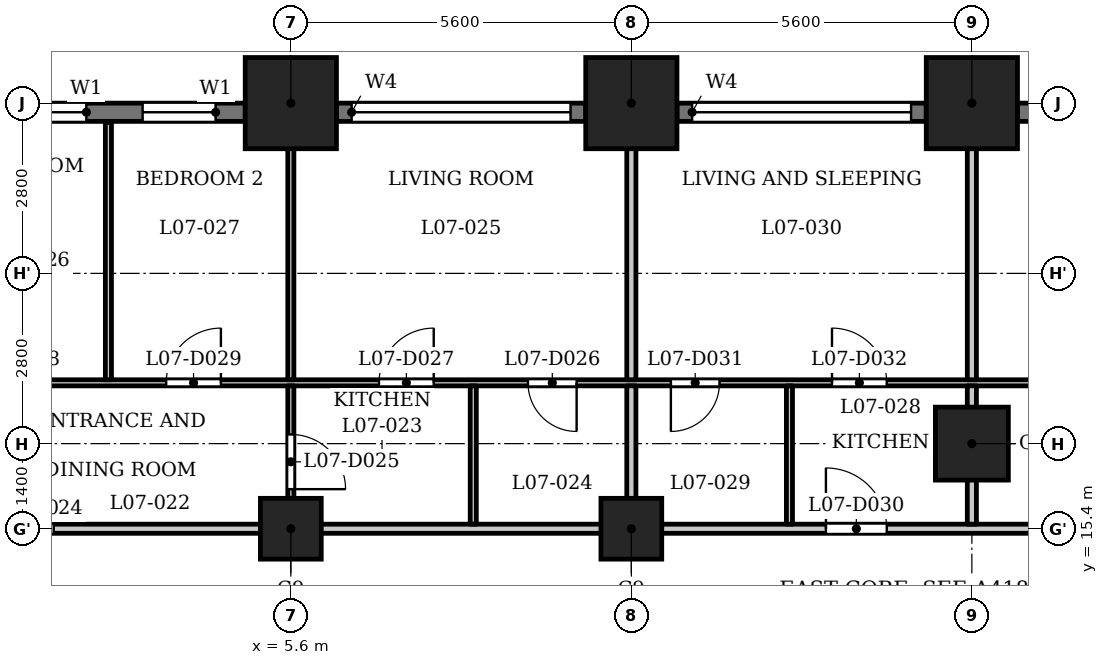
"""IFC4 building model, lengths in metres.
Left out: names, types, materials, properties, quantities, classifications, styles, units other than length and angle.
Written with IfcOpenShell. Run it as: python <this file> out.ifc"""

import sys

from ifc_helpers import new_model, si_unit, direction, frame, frame_2d, origin, origin_2d, place, context, subcontext, project, spatial, rectangle, extrude, element, fill, save


model = new_model("IFC4")
c1 = context("Model", 3, precision=1e-05, world=origin(), true_north=direction((0.0, 1.0)))
c2 = subcontext(c1, "Body", "Model", "MODEL_VIEW")
j1 = project(units=[si_unit("LENGTHUNIT", "METRE"), si_unit("PLANEANGLEUNIT", "RADIAN")], contexts=[c1])
p1 = place(None, origin())
s1 = spatial("IfcSite", under=j1, at=p1, CompositionType="ELEMENT")
p2 = place(p1, origin())
s2 = spatial("IfcBuilding", under=s1, at=p2, CompositionType="ELEMENT")
p3 = place(p2, frame((0.0, 0.0, 34.0)))
s3 = spatial("IfcBuildingStorey", under=s2, at=p3, CompositionType="ELEMENT", Elevation=34.0)
for number, where, z_axis, x_axis in (
    (1, (16.8, 22.4, 0.0), (0.0, 0.0, 1.0), (1.0, 0.0, 0.0)),
    (2, (11.2, 22.4, 0.0), (0.0, 0.0, 1.0), (1.0, 0.0, 0.0)),
    (3, (5.6, 22.4, 0.0), (0.0, 0.0, 1.0), (1.0, 0.0, 0.0)),
):
    element("IfcColumn", number, at=place(p3, frame(where, z_axis=z_axis, x_axis=x_axis)), inside=s3, PredefinedType="COLUMN", context=c2, shape_type="SweptSolid", body=[
        extrude(rectangle(XDim=1.5, YDim=1.5, at=origin_2d()), origin(), (0.0, 0.0, 1.0), 3.5),
    ])
p4 = place(p3, frame((16.8, 16.8, 0.0), z_axis=(0.0, 0.0, 1.0), x_axis=(1.0, 0.0, 0.0)))
e4 = element("IfcColumn", 4, at=p4, inside=s3, PredefinedType="COLUMN", context=c2, shape_type="SweptSolid", body=[
    extrude(rectangle(XDim=1.2, YDim=1.2, at=origin_2d()), origin(), (0.0, 0.0, 1.0), 3.5),
])
for number, where, z_axis, x_axis in (
    (5, (5.6, 15.4, 0.0), (0.0, 0.0, 1.0), (1.0, 0.0, 0.0)),
    (6, (11.2, 15.4, 0.0), (0.0, 0.0, 1.0), (1.0, 0.0, 0.0)),
):
    element("IfcColumn", number, at=place(p3, frame(where, z_axis=z_axis, x_axis=x_axis)), inside=s3, PredefinedType="COLUMN", context=c2, shape_type="SweptSolid", body=[
        extrude(rectangle(XDim=1.0, YDim=1.0, at=origin_2d()), origin(), (0.0, 0.0, 1.0), 3.5),
    ])
p5 = place(p3, frame((20.0, 22.25, 0.0), z_axis=(0.0, 0.0, 1.0), x_axis=(-1.0, 0.0, 0.0)))
e7 = element("IfcWall", 7, at=p5, inside=s3, PredefinedType="SOLIDWALL", context=c2, shape_type="SweptSolid", body=[
    extrude(rectangle(XDim=2.45, YDim=0.3, at=frame_2d((1.225, 0.0))), origin(), (0.0, 0.0, 1.0), 2.35),
])
p6 = place(p5, frame((0.625, 0.0, 0.6)))
e8 = element("IfcOpeningElement", 8, at=p6, cuts=e7, PredefinedType="OPENING", context=c2, shape_type="SweptSolid", body=[
    extrude(rectangle(XDim=1.2, YDim=1.55, at=frame_2d((0.6, 0.775))), frame((0.0, 0.16, 0.0), z_axis=(0.0, -1.0, 0.0), x_axis=(1.0, 0.0, 0.0)), (0.0, 0.0, 1.0), 0.32),
])
p7 = place(p3, frame((16.05, 22.25, 0.0), z_axis=(0.0, 0.0, 1.0), x_axis=(-1.0, 0.0, 0.0)))
e9 = element("IfcWall", 9, at=p7, inside=s3, PredefinedType="SOLIDWALL", context=c2, shape_type="SweptSolid", body=[
    extrude(rectangle(XDim=4.1, YDim=0.3, at=frame_2d((2.05, 0.0))), origin(), (0.0, 0.0, 1.0), 2.35),
])
p8 = place(p7, frame((0.25, 0.0, 1.2)))
e10 = element("IfcOpeningElement", 10, at=p8, cuts=e9, PredefinedType="OPENING", context=c2, shape_type="SweptSolid", body=[
    extrude(rectangle(XDim=3.6, YDim=0.95, at=frame_2d((1.8, 0.475))), frame((0.0, 0.16, 0.0), z_axis=(0.0, -1.0, 0.0), x_axis=(1.0, 0.0, 0.0)), (0.0, 0.0, 1.0), 0.32),
])
p9 = place(p3, frame((10.45, 22.25, 0.0), z_axis=(0.0, 0.0, 1.0), x_axis=(-1.0, 0.0, 0.0)))
e11 = element("IfcWall", 11, at=p9, inside=s3, PredefinedType="SOLIDWALL", context=c2, shape_type="SweptSolid", body=[
    extrude(rectangle(XDim=4.1, YDim=0.3, at=frame_2d((2.05, 0.0))), origin(), (0.0, 0.0, 1.0), 2.35),
])
p10 = place(p9, frame((0.25, 0.0, 1.2)))
e12 = element("IfcOpeningElement", 12, at=p10, cuts=e11, PredefinedType="OPENING", context=c2, shape_type="SweptSolid", body=[
    extrude(rectangle(XDim=3.6, YDim=0.95, at=frame_2d((1.8, 0.475))), frame((0.0, 0.16, 0.0), z_axis=(0.0, -1.0, 0.0), x_axis=(1.0, 0.0, 0.0)), (0.0, 0.0, 1.0), 0.32),
])
p11 = place(p3, frame((4.85, 22.25, 0.0), z_axis=(0.0, 0.0, 1.0), x_axis=(-1.0, 0.0, 0.0)))
e13 = element("IfcWall", 13, at=p11, inside=s3, PredefinedType="SOLIDWALL", context=c2, shape_type="SweptSolid", body=[
    extrude(rectangle(XDim=4.1, YDim=0.3, at=frame_2d((2.05, 0.0))), origin(), (0.0, 0.0, 1.0), 2.35),
])
p12 = place(p11, frame((0.488, 0.0, 0.6)))
e14 = element("IfcOpeningElement", 14, at=p12, cuts=e13, PredefinedType="OPENING", context=c2, shape_type="SweptSolid", body=[
    extrude(rectangle(XDim=1.2, YDim=1.55, at=frame_2d((0.6, 0.775))), frame((0.0, 0.16, 0.0), z_axis=(0.0, -1.0, 0.0), x_axis=(1.0, 0.0, 0.0)), (0.0, 0.0, 1.0), 0.32),
])
p13 = place(p11, frame((2.613, 0.0, 0.6)))
e15 = element("IfcOpeningElement", 15, at=p13, cuts=e13, PredefinedType="OPENING", context=c2, shape_type="SweptSolid", body=[
    extrude(rectangle(XDim=1.2, YDim=1.55, at=frame_2d((0.6, 0.775))), frame((0.0, 0.16, 0.0), z_axis=(0.0, -1.0, 0.0), x_axis=(1.0, 0.0, 0.0)), (0.0, 0.0, 1.0), 0.32),
])
p14 = place(p3, frame((-27.484, 15.4, 0.0), z_axis=(0.0, 0.0, 1.0), x_axis=(1.0, 0.0, 0.0)))
e16 = element("IfcWall", 16, at=p14, inside=s3, PredefinedType="PARTITIONING", context=c2, shape_type="SweptSolid", body=[
    extrude(rectangle(XDim=54.968, YDim=0.15, at=frame_2d((27.484, 0.0))), origin(), (0.0, 0.0, 1.0), 3.2),
])
p15 = place(p14, frame((8.784, 0.0, 0.0)))
e17 = element("IfcOpeningElement", 17, at=p15, cuts=e16, PredefinedType="OPENING", context=c2, shape_type="SweptSolid", body=[
    extrude(rectangle(XDim=1.0, YDim=2.1, at=frame_2d((0.5, 1.05))), frame((0.0, 0.085, 0.0), z_axis=(0.0, -1.0, 0.0), x_axis=(1.0, 0.0, 0.0)), (0.0, 0.0, 1.0), 0.17),
])
p16 = place(p14, frame((14.634, 0.0, 0.0)))
e18 = element("IfcOpeningElement", 18, at=p16, cuts=e16, PredefinedType="OPENING", context=c2, shape_type="SweptSolid", body=[
    extrude(rectangle(XDim=1.0, YDim=2.1, at=frame_2d((0.5, 1.05))), frame((0.0, 0.085, 0.0), z_axis=(0.0, -1.0, 0.0), x_axis=(1.0, 0.0, 0.0)), (0.0, 0.0, 1.0), 0.17),
])
p17 = place(p14, frame((23.834, 0.0, 0.0)))
e19 = element("IfcOpeningElement", 19, at=p17, cuts=e16, PredefinedType="OPENING", context=c2, shape_type="SweptSolid", body=[
    extrude(rectangle(XDim=1.0, YDim=2.1, at=frame_2d((0.5, 1.05))), frame((0.0, 0.085, 0.0), z_axis=(0.0, -1.0, 0.0), x_axis=(1.0, 0.0, 0.0)), (0.0, 0.0, 1.0), 0.17),
])
p18 = place(p14, frame((28.184, 0.0, 0.0)))
e20 = element("IfcOpeningElement", 20, at=p18, cuts=e16, PredefinedType="OPENING", context=c2, shape_type="SweptSolid", body=[
    extrude(rectangle(XDim=1.0, YDim=2.1, at=frame_2d((0.5, 1.05))), frame((0.0, 0.085, 0.0), z_axis=(0.0, -1.0, 0.0), x_axis=(1.0, 0.0, 0.0)), (0.0, 0.0, 1.0), 0.17),
])
p19 = place(p14, frame((41.884, 0.0, 0.0)))
e21 = element("IfcOpeningElement", 21, at=p19, cuts=e16, PredefinedType="OPENING", context=c2, shape_type="SweptSolid", body=[
    extrude(rectangle(XDim=1.0, YDim=2.1, at=frame_2d((0.5, 1.05))), frame((0.0, 0.085, 0.0), z_axis=(0.0, -1.0, 0.0), x_axis=(1.0, 0.0, 0.0)), (0.0, 0.0, 1.0), 0.17),
])
p20 = place(p14, frame((48.234, 0.0, 0.0)))
e22 = element("IfcOpeningElement", 22, at=p20, cuts=e16, PredefinedType="OPENING", context=c2, shape_type="SweptSolid", body=[
    extrude(rectangle(XDim=1.0, YDim=2.1, at=frame_2d((0.5, 1.05))), frame((0.0, 0.085, 0.0), z_axis=(0.0, -1.0, 0.0), x_axis=(1.0, 0.0, 0.0)), (0.0, 0.0, 1.0), 0.17),
])
p21 = place(p3, frame((-26.732, 17.8, 0.0), z_axis=(0.0, 0.0, 1.0), x_axis=(1.0, 0.0, 0.0)))
e23 = element("IfcWall", 23, at=p21, inside=s3, PredefinedType="PARTITIONING", context=c2, shape_type="SweptSolid", body=[
    extrude(rectangle(XDim=53.126, YDim=0.1, at=frame_2d((26.563, 0.0))), origin(), (0.0, 0.0, 1.0), 3.2),
])
p22 = place(p21, frame((2.964, 0.0, 0.0)))
e24 = element("IfcOpeningElement", 24, at=p22, cuts=e23, PredefinedType="OPENING", context=c2, shape_type="SweptSolid", body=[
    extrude(rectangle(XDim=0.8, YDim=2.1, at=frame_2d((0.4, 1.05))), frame((0.0, 0.06, 0.0), z_axis=(0.0, -1.0, 0.0), x_axis=(1.0, 0.0, 0.0)), (0.0, 0.0, 1.0), 0.12),
])
p23 = place(p21, frame((7.132, 0.0, 0.0)))
e25 = element("IfcOpeningElement", 25, at=p23, cuts=e23, PredefinedType="OPENING", context=c2, shape_type="SweptSolid", body=[
    extrude(rectangle(XDim=0.9, YDim=2.1, at=frame_2d((0.45, 1.05))), frame((0.0, 0.06, 0.0), z_axis=(0.0, -1.0, 0.0), x_axis=(1.0, 0.0, 0.0)), (0.0, 0.0, 1.0), 0.12),
])
p24 = place(p21, frame((19.432, 0.0, 0.0)))
e26 = element("IfcOpeningElement", 26, at=p24, cuts=e23, PredefinedType="OPENING", context=c2, shape_type="SweptSolid", body=[
    extrude(rectangle(XDim=0.8, YDim=2.1, at=frame_2d((0.4, 1.05))), frame((0.0, 0.06, 0.0), z_axis=(0.0, -1.0, 0.0), x_axis=(1.0, 0.0, 0.0)), (0.0, 0.0, 1.0), 0.12),
])
p25 = place(p21, frame((16.732, 0.0, 0.0)))
e27 = element("IfcOpeningElement", 27, at=p25, cuts=e23, PredefinedType="OPENING", context=c2, shape_type="SweptSolid", body=[
    extrude(rectangle(XDim=0.9, YDim=2.1, at=frame_2d((0.45, 1.05))), frame((0.0, 0.06, 0.0), z_axis=(0.0, -1.0, 0.0), x_axis=(1.0, 0.0, 0.0)), (0.0, 0.0, 1.0), 0.12),
])
p26 = place(p21, frame((10.982, 0.0, 0.0)))
e28 = element("IfcOpeningElement", 28, at=p26, cuts=e23, PredefinedType="OPENING", context=c2, shape_type="SweptSolid", body=[
    extrude(rectangle(XDim=0.9, YDim=2.1, at=frame_2d((0.45, 1.05))), frame((0.0, 0.06, 0.0), z_axis=(0.0, -1.0, 0.0), x_axis=(1.0, 0.0, 0.0)), (0.0, 0.0, 1.0), 0.12),
])
p27 = place(p21, frame((12.982, 0.0, 0.0)))
e29 = element("IfcOpeningElement", 29, at=p27, cuts=e23, PredefinedType="OPENING", context=c2, shape_type="SweptSolid", body=[
    extrude(rectangle(XDim=0.9, YDim=2.1, at=frame_2d((0.45, 1.05))), frame((0.0, 0.06, 0.0), z_axis=(0.0, -1.0, 0.0), x_axis=(1.0, 0.0, 0.0)), (0.0, 0.0, 1.0), 0.12),
])
p28 = place(p21, frame((25.382, 0.0, 0.0)))
e30 = element("IfcOpeningElement", 30, at=p28, cuts=e23, PredefinedType="OPENING", context=c2, shape_type="SweptSolid", body=[
    extrude(rectangle(XDim=0.8, YDim=2.1, at=frame_2d((0.4, 1.05))), frame((0.0, 0.06, 0.0), z_axis=(0.0, -1.0, 0.0), x_axis=(1.0, 0.0, 0.0)), (0.0, 0.0, 1.0), 0.12),
])
p29 = place(p21, frame((22.182, 0.0, 0.0)))
e31 = element("IfcOpeningElement", 31, at=p29, cuts=e23, PredefinedType="OPENING", context=c2, shape_type="SweptSolid", body=[
    extrude(rectangle(XDim=0.9, YDim=2.1, at=frame_2d((0.45, 1.05))), frame((0.0, 0.06, 0.0), z_axis=(0.0, -1.0, 0.0), x_axis=(1.0, 0.0, 0.0)), (0.0, 0.0, 1.0), 0.12),
])
p30 = place(p21, frame((36.232, 0.0, 0.0)))
e32 = element("IfcOpeningElement", 32, at=p30, cuts=e23, PredefinedType="OPENING", context=c2, shape_type="SweptSolid", body=[
    extrude(rectangle(XDim=0.8, YDim=2.1, at=frame_2d((0.4, 1.05))), frame((0.0, 0.06, 0.0), z_axis=(0.0, -1.0, 0.0), x_axis=(1.0, 0.0, 0.0)), (0.0, 0.0, 1.0), 0.12),
])
p31 = place(p21, frame((33.782, 0.0, 0.0)))
e33 = element("IfcOpeningElement", 33, at=p31, cuts=e23, PredefinedType="OPENING", context=c2, shape_type="SweptSolid", body=[
    extrude(rectangle(XDim=0.9, YDim=2.1, at=frame_2d((0.45, 1.05))), frame((0.0, 0.06, 0.0), z_axis=(0.0, -1.0, 0.0), x_axis=(1.0, 0.0, 0.0)), (0.0, 0.0, 1.0), 0.12),
])
p32 = place(p21, frame((27.282, 0.0, 0.0)))
e34 = element("IfcOpeningElement", 34, at=p32, cuts=e23, PredefinedType="OPENING", context=c2, shape_type="SweptSolid", body=[
    extrude(rectangle(XDim=0.9, YDim=2.1, at=frame_2d((0.45, 1.05))), frame((0.0, 0.06, 0.0), z_axis=(0.0, -1.0, 0.0), x_axis=(1.0, 0.0, 0.0)), (0.0, 0.0, 1.0), 0.12),
])
p33 = place(p21, frame((30.282, 0.0, 0.0)))
e35 = element("IfcOpeningElement", 35, at=p33, cuts=e23, PredefinedType="OPENING", context=c2, shape_type="SweptSolid", body=[
    extrude(rectangle(XDim=0.9, YDim=2.1, at=frame_2d((0.45, 1.05))), frame((0.0, 0.06, 0.0), z_axis=(0.0, -1.0, 0.0), x_axis=(1.0, 0.0, 0.0)), (0.0, 0.0, 1.0), 0.12),
])
p34 = place(p21, frame((38.582, 0.0, 0.0)))
e36 = element("IfcOpeningElement", 36, at=p34, cuts=e23, PredefinedType="OPENING", context=c2, shape_type="SweptSolid", body=[
    extrude(rectangle(XDim=0.8, YDim=2.1, at=frame_2d((0.4, 1.05))), frame((0.0, 0.06, 0.0), z_axis=(0.0, -1.0, 0.0), x_axis=(1.0, 0.0, 0.0)), (0.0, 0.0, 1.0), 0.12),
])
p35 = place(p21, frame((41.232, 0.0, 0.0)))
e37 = element("IfcOpeningElement", 37, at=p35, cuts=e23, PredefinedType="OPENING", context=c2, shape_type="SweptSolid", body=[
    extrude(rectangle(XDim=0.9, YDim=2.1, at=frame_2d((0.45, 1.05))), frame((0.0, 0.06, 0.0), z_axis=(0.0, -1.0, 0.0), x_axis=(1.0, 0.0, 0.0)), (0.0, 0.0, 1.0), 0.12),
])
p36 = place(p21, frame((51.532, 0.0, 0.0)))
e38 = element("IfcOpeningElement", 38, at=p36, cuts=e23, PredefinedType="OPENING", context=c2, shape_type="SweptSolid", body=[
    extrude(rectangle(XDim=0.8, YDim=2.1, at=frame_2d((0.4, 1.05))), frame((0.0, 0.06, 0.0), z_axis=(0.0, -1.0, 0.0), x_axis=(1.0, 0.0, 0.0)), (0.0, 0.0, 1.0), 0.12),
])
p37 = place(p21, frame((46.582, 0.0, 0.0)))
e39 = element("IfcOpeningElement", 39, at=p37, cuts=e23, PredefinedType="OPENING", context=c2, shape_type="SweptSolid", body=[
    extrude(rectangle(XDim=0.9, YDim=2.1, at=frame_2d((0.45, 1.05))), frame((0.0, 0.06, 0.0), z_axis=(0.0, -1.0, 0.0), x_axis=(1.0, 0.0, 0.0)), (0.0, 0.0, 1.0), 0.12),
])
p38 = place(p3, frame((2.6, 17.85, 0.0), z_axis=(0.0, 0.0, 1.0), x_axis=(0.0, 1.0, 0.0)))
e40 = element("IfcWall", 40, at=p38, inside=s3, PredefinedType="PARTITIONING", context=c2, shape_type="SweptSolid", body=[
    extrude(rectangle(XDim=4.23, YDim=0.1, at=frame_2d((2.115, 0.0))), origin(), (0.0, 0.0, 1.0), 3.2),
])
p39 = place(p3, frame((5.6, 15.475, 0.0), z_axis=(0.0, 0.0, 1.0), x_axis=(0.0, 1.0, 0.0)))
e41 = element("IfcWall", 41, at=p39, inside=s3, PredefinedType="PARTITIONING", context=c2, shape_type="SweptSolid", body=[
    extrude(rectangle(XDim=2.275, YDim=0.1, at=frame_2d((1.137, 0.0))), origin(), (0.0, 0.0, 1.0), 3.2),
])
p40 = place(p39, frame((0.576, 0.0, 0.0)))
e42 = element("IfcOpeningElement", 42, at=p40, cuts=e41, PredefinedType="OPENING", context=c2, shape_type="SweptSolid", body=[
    extrude(rectangle(XDim=0.9, YDim=2.1, at=frame_2d((0.45, 1.05))), frame((0.0, 0.06, 0.0), z_axis=(0.0, -1.0, 0.0), x_axis=(1.0, 0.0, 0.0)), (0.0, 0.0, 1.0), 0.12),
])
p41 = place(p3, frame((5.6, 17.85, 0.0), z_axis=(0.0, 0.0, 1.0), x_axis=(0.0, 1.0, 0.0)))
e43 = element("IfcWall", 43, at=p41, inside=s3, PredefinedType="PARTITIONING", context=c2, shape_type="SweptSolid", body=[
    extrude(rectangle(XDim=5.28, YDim=0.1, at=frame_2d((2.64, 0.0))), origin(), (0.0, 0.0, 1.0), 3.2),
])
p42 = place(p3, frame((8.6, 15.475, 0.0), z_axis=(0.0, 0.0, 1.0), x_axis=(0.0, 1.0, 0.0)))
e44 = element("IfcWall", 44, at=p42, inside=s3, PredefinedType="PARTITIONING", context=c2, shape_type="SweptSolid", body=[
    extrude(rectangle(XDim=2.275, YDim=0.1, at=frame_2d((1.137, 0.0))), origin(), (0.0, 0.0, 1.0), 3.2),
])
p43 = place(p3, frame((11.2, 15.475, 0.0), z_axis=(0.0, 0.0, 1.0), x_axis=(0.0, 1.0, 0.0)))
e45 = element("IfcWall", 45, at=p43, inside=s3, PredefinedType="PARTITIONING", context=c2, shape_type="SweptSolid", body=[
    extrude(rectangle(XDim=2.275, YDim=0.15, at=frame_2d((1.137, 0.0))), origin(), (0.0, 0.0, 1.0), 3.2),
])
p44 = place(p3, frame((11.2, 17.85, 0.0), z_axis=(0.0, 0.0, 1.0), x_axis=(0.0, 1.0, 0.0)))
e46 = element("IfcWall", 46, at=p44, inside=s3, PredefinedType="PARTITIONING", context=c2, shape_type="SweptSolid", body=[
    extrude(rectangle(XDim=5.28, YDim=0.15, at=frame_2d((2.64, 0.0))), origin(), (0.0, 0.0, 1.0), 3.2),
])
p45 = place(p3, frame((13.8, 15.475, 0.0), z_axis=(0.0, 0.0, 1.0), x_axis=(0.0, 1.0, 0.0)))
e47 = element("IfcWall", 47, at=p45, inside=s3, PredefinedType="PARTITIONING", context=c2, shape_type="SweptSolid", body=[
    extrude(rectangle(XDim=2.275, YDim=0.1, at=frame_2d((1.137, 0.0))), origin(), (0.0, 0.0, 1.0), 3.2),
])
p46 = place(p3, frame((16.8, 15.475, 0.0), z_axis=(0.0, 0.0, 1.0), x_axis=(0.0, 1.0, 0.0)))
e48 = element("IfcWall", 48, at=p46, inside=s3, PredefinedType="PARTITIONING", context=c2, shape_type="SweptSolid", body=[
    extrude(rectangle(XDim=2.275, YDim=0.15, at=frame_2d((1.137, 0.0))), origin(), (0.0, 0.0, 1.0), 3.2),
])
p47 = place(p3, frame((16.8, 17.85, 0.0), z_axis=(0.0, 0.0, 1.0), x_axis=(0.0, 1.0, 0.0)))
e49 = element("IfcWall", 49, at=p47, inside=s3, PredefinedType="PARTITIONING", context=c2, shape_type="SweptSolid", body=[
    extrude(rectangle(XDim=5.28, YDim=0.15, at=frame_2d((2.64, 0.0))), origin(), (0.0, 0.0, 1.0), 3.2),
])
p48 = place(p18, origin())
e50 = element("IfcDoor", 50, at=p48, inside=s3, OperationType="SINGLE_SWING_RIGHT", PredefinedType="DOOR", context=c2, shape_type="SweptSolid", body=[
    extrude(rectangle(XDim=1.0, YDim=2.1, at=frame_2d((0.5, 1.05))), frame((0.0, 0.025, 0.0), z_axis=(0.0, -1.0, 0.0), x_axis=(1.0, 0.0, 0.0)), (0.0, 0.0, 1.0), 0.05),
])
fill(e20, e50)
p49 = place(p40, origin())
e51 = element("IfcDoor", 51, at=p49, inside=s3, OperationType="SINGLE_SWING_LEFT", PredefinedType="DOOR", context=c2, shape_type="SweptSolid", body=[
    extrude(rectangle(XDim=0.9, YDim=2.1, at=frame_2d((0.45, 1.05))), frame((0.0, 0.025, 0.0), z_axis=(0.0, -1.0, 0.0), x_axis=(1.0, 0.0, 0.0)), (0.0, 0.0, 1.0), 0.05),
])
fill(e42, e51)
p50 = place(p30, origin())
e52 = element("IfcDoor", 52, at=p50, inside=s3, OperationType="SINGLE_SWING_RIGHT", PredefinedType="DOOR", context=c2, shape_type="SweptSolid", body=[
    extrude(rectangle(XDim=0.8, YDim=2.1, at=frame_2d((0.4, 1.05))), frame((0.0, 0.025, 0.0), z_axis=(0.0, -1.0, 0.0), x_axis=(1.0, 0.0, 0.0)), (0.0, 0.0, 1.0), 0.05),
])
fill(e32, e52)
p51 = place(p31, origin())
e53 = element("IfcDoor", 53, at=p51, inside=s3, OperationType="SINGLE_SWING_LEFT", PredefinedType="DOOR", context=c2, shape_type="SweptSolid", body=[
    extrude(rectangle(XDim=0.9, YDim=2.1, at=frame_2d((0.45, 1.05))), frame((0.0, 0.025, 0.0), z_axis=(0.0, -1.0, 0.0), x_axis=(1.0, 0.0, 0.0)), (0.0, 0.0, 1.0), 0.05),
])
fill(e33, e53)
p52 = place(p33, origin())
e54 = element("IfcDoor", 54, at=p52, inside=s3, OperationType="SINGLE_SWING_LEFT", PredefinedType="DOOR", context=c2, shape_type="SweptSolid", body=[
    extrude(rectangle(XDim=0.9, YDim=2.1, at=frame_2d((0.45, 1.05))), frame((0.0, 0.025, 0.0), z_axis=(0.0, -1.0, 0.0), x_axis=(1.0, 0.0, 0.0)), (0.0, 0.0, 1.0), 0.05),
])
fill(e35, e54)
p53 = place(p19, origin())
e55 = element("IfcDoor", 55, at=p53, inside=s3, OperationType="SINGLE_SWING_RIGHT", PredefinedType="DOOR", context=c2, shape_type="SweptSolid", body=[
    extrude(rectangle(XDim=1.0, YDim=2.1, at=frame_2d((0.5, 1.05))), frame((0.0, 0.025, 0.0), z_axis=(0.0, -1.0, 0.0), x_axis=(1.0, 0.0, 0.0)), (0.0, 0.0, 1.0), 0.05),
])
fill(e21, e55)
p54 = place(p34, origin())
e56 = element("IfcDoor", 56, at=p54, inside=s3, OperationType="SINGLE_SWING_LEFT", PredefinedType="DOOR", context=c2, shape_type="SweptSolid", body=[
    extrude(rectangle(XDim=0.8, YDim=2.1, at=frame_2d((0.4, 1.05))), frame((0.0, 0.025, 0.0), z_axis=(0.0, -1.0, 0.0), x_axis=(1.0, 0.0, 0.0)), (0.0, 0.0, 1.0), 0.05),
])
fill(e36, e56)
p55 = place(p35, origin())
e57 = element("IfcDoor", 57, at=p55, inside=s3, OperationType="SINGLE_SWING_RIGHT", PredefinedType="DOOR", context=c2, shape_type="SweptSolid", body=[
    extrude(rectangle(XDim=0.9, YDim=2.1, at=frame_2d((0.45, 1.05))), frame((0.0, 0.025, 0.0), z_axis=(0.0, -1.0, 0.0), x_axis=(1.0, 0.0, 0.0)), (0.0, 0.0, 1.0), 0.05),
])
fill(e37, e57)
p56 = place(p8, origin())
e58 = element("IfcWindow", 58, at=p56, inside=s3, PartitioningType="SINGLE_PANEL", PredefinedType="WINDOW", context=c2, shape_type="SweptSolid", body=[
    extrude(rectangle(XDim=3.6, YDim=0.95, at=frame_2d((1.8, 0.475))), frame((0.0, 0.03, 0.0), z_axis=(0.0, -1.0, 0.0), x_axis=(1.0, 0.0, 0.0)), (0.0, 0.0, 1.0), 0.06),
])
fill(e10, e58)
p57 = place(p10, origin())
e59 = element("IfcWindow", 59, at=p57, inside=s3, PartitioningType="SINGLE_PANEL", PredefinedType="WINDOW", context=c2, shape_type="SweptSolid", body=[
    extrude(rectangle(XDim=3.6, YDim=0.95, at=frame_2d((1.8, 0.475))), frame((0.0, 0.03, 0.0), z_axis=(0.0, -1.0, 0.0), x_axis=(1.0, 0.0, 0.0)), (0.0, 0.0, 1.0), 0.06),
])
fill(e12, e59)
p58 = place(p12, origin())
e60 = element("IfcWindow", 60, at=p58, inside=s3, PartitioningType="SINGLE_PANEL", PredefinedType="WINDOW", context=c2, shape_type="SweptSolid", body=[
    extrude(rectangle(XDim=1.2, YDim=1.55, at=frame_2d((0.6, 0.775))), frame((0.0, 0.03, 0.0), z_axis=(0.0, -1.0, 0.0), x_axis=(1.0, 0.0, 0.0)), (0.0, 0.0, 1.0), 0.06),
])
fill(e14, e60)
p59 = place(p13, origin())
e61 = element("IfcWindow", 61, at=p59, inside=s3, PartitioningType="SINGLE_PANEL", PredefinedType="WINDOW", context=c2, shape_type="SweptSolid", body=[
    extrude(rectangle(XDim=1.2, YDim=1.55, at=frame_2d((0.6, 0.775))), frame((0.0, 0.03, 0.0), z_axis=(0.0, -1.0, 0.0), x_axis=(1.0, 0.0, 0.0)), (0.0, 0.0, 1.0), 0.06),
])
fill(e15, e61)
save(model, sys.argv[1])
